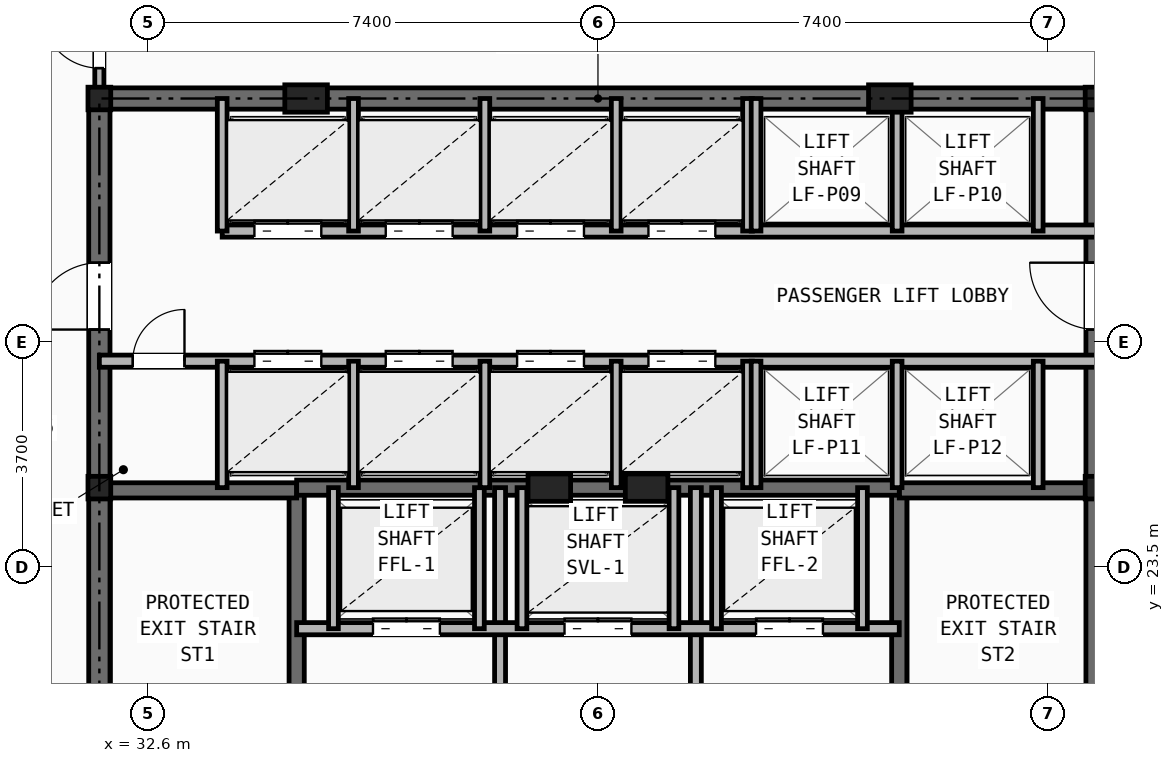
"""IFC4 building model, lengths in metres.
Left out: names, types, materials, properties, quantities, classifications, styles, units other than length and angle.
Written with IfcOpenShell. Run it as: python <this file> out.ifc"""

import sys

from ifc_helpers import new_model, si_unit, direction, frame, frame_2d, origin, origin_2d, place, context, subcontext, project, spatial, rectangle, i_section, extrude, element, fill, save


model = new_model("IFC4")
c1 = context("Model", 3, precision=1e-05, world=origin(), true_north=direction((0.0, 1.0)))
c2 = subcontext(c1, "Body", "Model", "MODEL_VIEW")
j1 = project(units=[si_unit("LENGTHUNIT", "METRE"), si_unit("PLANEANGLEUNIT", "RADIAN")], contexts=[c1])
p1 = place(None, origin())
s1 = spatial("IfcSite", under=j1, at=p1, CompositionType="ELEMENT")
p2 = place(p1, origin())
s2 = spatial("IfcBuilding", under=s1, at=p2, CompositionType="ELEMENT")
p3 = place(p2, frame((0.0, 0.0, 111.8)))
s3 = spatial("IfcBuildingStorey", under=s2, at=p3, CompositionType="ELEMENT", Elevation=111.8)
for number, where, z_axis, x_axis in (
    (1, (31.8, 24.8, 0.0), (0.0, 0.0, 1.0), (1.0, 0.0, 0.0)),
    (2, (48.2, 24.8, 0.0), (0.0, 0.0, 1.0), (1.0, 0.0, 0.0)),
    (3, (31.8, 31.2, 0.0), (0.0, 0.0, 1.0), (1.0, 0.0, 0.0)),
    (4, (48.2, 31.2, 0.0), (0.0, 0.0, 1.0), (1.0, 0.0, 0.0)),
):
    element("IfcColumn", number, at=place(p3, frame(where, z_axis=z_axis, x_axis=x_axis)), inside=s3, PredefinedType="COLUMN", context=c2, shape_type="SweptSolid", body=[
        extrude(i_section(OverallWidth=0.374, OverallDepth=0.372, WebThickness=0.016, FlangeThickness=0.026, at=origin_2d()), origin(), (0.0, 0.0, 1.0), 4.2),
    ])
for number, where, z_axis, x_axis in (
    (5, (35.2, 31.2, 0.0), (0.0, 0.0, 1.0), (1.0, 0.0, 0.0)),
    (6, (44.8, 31.2, 0.0), (0.0, 0.0, 1.0), (1.0, 0.0, 0.0)),
    (7, (39.2, 24.8, 0.0), (0.0, 0.0, 1.0), (1.0, 0.0, 0.0)),
    (8, (40.8, 24.8, 0.0), (0.0, 0.0, 1.0), (1.0, 0.0, 0.0)),
):
    element("IfcColumn", number, at=place(p3, frame(where, z_axis=z_axis, x_axis=x_axis)), inside=s3, PredefinedType="PILASTER", context=c2, shape_type="SweptSolid", body=[
        extrude(rectangle(XDim=0.7, YDim=0.45, at=origin_2d()), origin(), (0.0, 0.0, 1.0), 4.2),
    ])
p4 = place(p3, frame((31.8, 31.2, 0.0), z_axis=(0.0, 0.0, 1.0), x_axis=(1.0, 0.0, 0.0)))
e9 = element("IfcWall", 9, at=p4, inside=s3, PredefinedType="SHEAR", context=c2, shape_type="SweptSolid", body=[
    extrude(rectangle(XDim=16.4, YDim=0.35, at=frame_2d((8.2, 0.0))), origin(), (0.0, 0.0, 1.0), 3.96),
])
p5 = place(p3, frame((31.8, 16.4, 0.0), z_axis=(0.0, 0.0, 1.0), x_axis=(0.0, 1.0, 0.0)))
e10 = element("IfcWall", 10, at=p5, inside=s3, PredefinedType="SHEAR", context=c2, shape_type="SweptSolid", body=[
    extrude(rectangle(XDim=14.8, YDim=0.35, at=frame_2d((7.4, 0.0))), origin(), (0.0, 0.0, 1.0), 3.96),
])
p6 = place(p5, frame((11.0, 0.0, 0.0)))
e11 = element("IfcOpeningElement", 11, at=p6, cuts=e10, PredefinedType="OPENING", context=c2, shape_type="SweptSolid", body=[
    extrude(rectangle(XDim=1.1, YDim=2.15, at=frame_2d((0.55, 1.075))), frame((0.0, 0.185, 0.0), z_axis=(0.0, -1.0, 0.0), x_axis=(1.0, 0.0, 0.0)), (0.0, 0.0, 1.0), 0.37),
])
p7 = place(p3, frame((48.2, 16.4, 0.0), z_axis=(0.0, 0.0, 1.0), x_axis=(0.0, 1.0, 0.0)))
e12 = element("IfcWall", 12, at=p7, inside=s3, PredefinedType="SHEAR", context=c2, shape_type="SweptSolid", body=[
    extrude(rectangle(XDim=14.8, YDim=0.35, at=frame_2d((7.4, 0.0))), origin(), (0.0, 0.0, 1.0), 3.96),
])
p8 = place(p7, frame((11.0, 0.0, 0.0)))
e13 = element("IfcOpeningElement", 13, at=p8, cuts=e12, PredefinedType="OPENING", context=c2, shape_type="SweptSolid", body=[
    extrude(rectangle(XDim=1.1, YDim=2.15, at=frame_2d((0.55, 1.075))), frame((0.0, 0.185, 0.0), z_axis=(0.0, -1.0, 0.0), x_axis=(1.0, 0.0, 0.0)), (0.0, 0.0, 1.0), 0.37),
])
p9 = place(p3, frame((35.045, 16.4, 0.0), z_axis=(0.0, 0.0, 1.0), x_axis=(0.0, 1.0, 0.0)))
e14 = element("IfcWall", 14, at=p9, inside=s3, PredefinedType="SHEAR", context=c2, shape_type="SweptSolid", body=[
    extrude(rectangle(XDim=8.4, YDim=0.25, at=frame_2d((4.2, 0.0))), origin(), (0.0, 0.0, 1.0), 3.96),
])
p10 = place(p9, frame((0.45, 0.0, 0.0)))
e15 = element("IfcOpeningElement", 15, at=p10, cuts=e14, PredefinedType="OPENING", context=c2, shape_type="SweptSolid", body=[
    extrude(rectangle(XDim=0.95, YDim=2.1, at=frame_2d((0.475, 1.05))), frame((0.0, 0.135, 0.0), z_axis=(0.0, -1.0, 0.0), x_axis=(1.0, 0.0, 0.0)), (0.0, 0.0, 1.0), 0.27),
])
p11 = place(p3, frame((31.8, 24.755, 0.0), z_axis=(0.0, 0.0, 1.0), x_axis=(1.0, 0.0, 0.0)))
e16 = element("IfcWall", 16, at=p11, inside=s3, PredefinedType="SHEAR", context=c2, shape_type="SweptSolid", body=[
    extrude(rectangle(XDim=3.245, YDim=0.25, at=frame_2d((1.623, 0.0))), origin(), (0.0, 0.0, 1.0), 3.96),
])
p12 = place(p3, frame((44.955, 16.4, 0.0), z_axis=(0.0, 0.0, 1.0), x_axis=(0.0, 1.0, 0.0)))
e17 = element("IfcWall", 17, at=p12, inside=s3, PredefinedType="SHEAR", context=c2, shape_type="SweptSolid", body=[
    extrude(rectangle(XDim=8.4, YDim=0.25, at=frame_2d((4.2, 0.0))), origin(), (0.0, 0.0, 1.0), 3.96),
])
p13 = place(p12, frame((0.45, 0.0, 0.0)))
e18 = element("IfcOpeningElement", 18, at=p13, cuts=e17, PredefinedType="OPENING", context=c2, shape_type="SweptSolid", body=[
    extrude(rectangle(XDim=0.95, YDim=2.1, at=frame_2d((0.475, 1.05))), frame((0.0, 0.135, 0.0), z_axis=(0.0, -1.0, 0.0), x_axis=(1.0, 0.0, 0.0)), (0.0, 0.0, 1.0), 0.27),
])
p14 = place(p3, frame((44.955, 24.755, 0.0), z_axis=(0.0, 0.0, 1.0), x_axis=(1.0, 0.0, 0.0)))
e19 = element("IfcWall", 19, at=p14, inside=s3, PredefinedType="SHEAR", context=c2, shape_type="SweptSolid", body=[
    extrude(rectangle(XDim=3.245, YDim=0.25, at=frame_2d((1.623, 0.0))), origin(), (0.0, 0.0, 1.0), 3.96),
])
p15 = place(p3, frame((35.045, 24.8, 0.0), z_axis=(0.0, 0.0, 1.0), x_axis=(1.0, 0.0, 0.0)))
e20 = element("IfcWall", 20, at=p15, inside=s3, PredefinedType="SHEAR", context=c2, shape_type="SweptSolid", body=[
    extrude(rectangle(XDim=9.91, YDim=0.25, at=frame_2d((4.955, 0.0))), origin(), (0.0, 0.0, 1.0), 3.96),
])
p16 = place(p3, frame((38.39, 16.4, 0.0), z_axis=(0.0, 0.0, 1.0), x_axis=(0.0, 1.0, 0.0)))
e21 = element("IfcWall", 21, at=p16, inside=s3, PredefinedType="PARTITIONING", context=c2, shape_type="SweptSolid", body=[
    extrude(rectangle(XDim=8.4, YDim=0.18, at=frame_2d((4.2, 0.0))), origin(), (0.0, 0.0, 1.0), 3.411),
])
p17 = place(p16, frame((3.85, 0.0, 0.0)))
e22 = element("IfcOpeningElement", 22, at=p17, cuts=e21, PredefinedType="OPENING", context=c2, shape_type="SweptSolid", body=[
    extrude(rectangle(XDim=0.95, YDim=2.1, at=frame_2d((0.475, 1.05))), frame((0.0, 0.1, 0.0), z_axis=(0.0, -1.0, 0.0), x_axis=(1.0, 0.0, 0.0)), (0.0, 0.0, 1.0), 0.2),
])
p18 = place(p3, frame((41.61, 16.4, 0.0), z_axis=(0.0, 0.0, 1.0), x_axis=(0.0, 1.0, 0.0)))
e23 = element("IfcWall", 23, at=p18, inside=s3, PredefinedType="PARTITIONING", context=c2, shape_type="SweptSolid", body=[
    extrude(rectangle(XDim=8.4, YDim=0.18, at=frame_2d((4.2, 0.0))), origin(), (0.0, 0.0, 1.0), 3.411),
])
p19 = place(p3, frame((35.045, 22.48, 0.0), z_axis=(0.0, 0.0, 1.0), x_axis=(1.0, 0.0, 0.0)))
e24 = element("IfcWall", 24, at=p19, inside=s3, PredefinedType="SOLIDWALL", context=c2, shape_type="SweptSolid", body=[
    extrude(rectangle(XDim=9.91, YDim=0.2, at=frame_2d((4.955, 0.0))), origin(), (0.0, 0.0, 1.0), 3.96),
])
p20 = place(p19, frame((1.255, 0.0, 0.0)))
e25 = element("IfcOpeningElement", 25, at=p20, cuts=e24, PredefinedType="OPENING", context=c2, shape_type="SweptSolid", body=[
    extrude(rectangle(XDim=1.1, YDim=2.15, at=frame_2d((0.55, 1.075))), frame((0.0, 0.11, 0.0), z_axis=(0.0, -1.0, 0.0), x_axis=(1.0, 0.0, 0.0)), (0.0, 0.0, 1.0), 0.22),
])
p21 = place(p19, frame((7.555, 0.0, 0.0)))
e26 = element("IfcOpeningElement", 26, at=p21, cuts=e24, PredefinedType="OPENING", context=c2, shape_type="SweptSolid", body=[
    extrude(rectangle(XDim=1.1, YDim=2.15, at=frame_2d((0.55, 1.075))), frame((0.0, 0.11, 0.0), z_axis=(0.0, -1.0, 0.0), x_axis=(1.0, 0.0, 0.0)), (0.0, 0.0, 1.0), 0.22),
])
p22 = place(p19, frame((4.405, 0.0, 0.0)))
e27 = element("IfcOpeningElement", 27, at=p22, cuts=e24, PredefinedType="OPENING", context=c2, shape_type="SweptSolid", body=[
    extrude(rectangle(XDim=1.1, YDim=2.15, at=frame_2d((0.55, 1.075))), frame((0.0, 0.11, 0.0), z_axis=(0.0, -1.0, 0.0), x_axis=(1.0, 0.0, 0.0)), (0.0, 0.0, 1.0), 0.22),
])
for number, where, z_axis, x_axis in (
    (28, (35.65, 22.48, 0.0), (0.0, 0.0, 1.0), (0.0, 1.0, 0.0)),
    (29, (38.05, 22.48, 0.0), (0.0, 0.0, 1.0), (0.0, 1.0, 0.0)),
    (30, (41.95, 22.48, 0.0), (0.0, 0.0, 1.0), (0.0, 1.0, 0.0)),
    (31, (44.35, 22.48, 0.0), (0.0, 0.0, 1.0), (0.0, 1.0, 0.0)),
    (32, (38.75, 22.48, 0.0), (0.0, 0.0, 1.0), (0.0, 1.0, 0.0)),
    (33, (41.25, 22.48, 0.0), (0.0, 0.0, 1.0), (0.0, 1.0, 0.0)),
):
    element("IfcWall", number, at=place(p3, frame(where, z_axis=z_axis, x_axis=x_axis)), inside=s3, PredefinedType="SOLIDWALL", context=c2, shape_type="SweptSolid", body=[
        extrude(rectangle(XDim=2.32, YDim=0.16, at=frame_2d((1.16, 0.0))), origin(), (0.0, 0.0, 1.0), 3.96),
    ])
p23 = place(p3, frame((33.82, 29.02, 0.0), z_axis=(0.0, 0.0, 1.0), x_axis=(1.0, 0.0, 0.0)))
e34 = element("IfcWall", 34, at=p23, inside=s3, PredefinedType="SOLIDWALL", context=c2, shape_type="SweptSolid", body=[
    extrude(rectangle(XDim=14.38, YDim=0.2, at=frame_2d((7.19, 0.0))), origin(), (0.0, 0.0, 1.0), 3.411),
])
p24 = place(p23, frame((0.53, 0.0, 0.0)))
e35 = element("IfcOpeningElement", 35, at=p24, cuts=e34, PredefinedType="OPENING", context=c2, shape_type="SweptSolid", body=[
    extrude(rectangle(XDim=1.1, YDim=2.15, at=frame_2d((0.55, 1.075))), frame((0.0, 0.11, 0.0), z_axis=(0.0, -1.0, 0.0), x_axis=(1.0, 0.0, 0.0)), (0.0, 0.0, 1.0), 0.22),
])
p25 = place(p23, frame((2.69, 0.0, 0.0)))
e36 = element("IfcOpeningElement", 36, at=p25, cuts=e34, PredefinedType="OPENING", context=c2, shape_type="SweptSolid", body=[
    extrude(rectangle(XDim=1.1, YDim=2.15, at=frame_2d((0.55, 1.075))), frame((0.0, 0.11, 0.0), z_axis=(0.0, -1.0, 0.0), x_axis=(1.0, 0.0, 0.0)), (0.0, 0.0, 1.0), 0.22),
])
p26 = place(p23, frame((4.85, 0.0, 0.0)))
e37 = element("IfcOpeningElement", 37, at=p26, cuts=e34, PredefinedType="OPENING", context=c2, shape_type="SweptSolid", body=[
    extrude(rectangle(XDim=1.1, YDim=2.15, at=frame_2d((0.55, 1.075))), frame((0.0, 0.11, 0.0), z_axis=(0.0, -1.0, 0.0), x_axis=(1.0, 0.0, 0.0)), (0.0, 0.0, 1.0), 0.22),
])
p27 = place(p23, frame((7.01, 0.0, 0.0)))
e38 = element("IfcOpeningElement", 38, at=p27, cuts=e34, PredefinedType="OPENING", context=c2, shape_type="SweptSolid", body=[
    extrude(rectangle(XDim=1.1, YDim=2.15, at=frame_2d((0.55, 1.075))), frame((0.0, 0.11, 0.0), z_axis=(0.0, -1.0, 0.0), x_axis=(1.0, 0.0, 0.0)), (0.0, 0.0, 1.0), 0.22),
])
p28 = place(p3, frame((31.8, 26.88, 0.0), z_axis=(0.0, 0.0, 1.0), x_axis=(1.0, 0.0, 0.0)))
e39 = element("IfcWall", 39, at=p28, inside=s3, PredefinedType="SOLIDWALL", context=c2, shape_type="SweptSolid", body=[
    extrude(rectangle(XDim=16.4, YDim=0.2, at=frame_2d((8.2, 0.0))), origin(), (0.0, 0.0, 1.0), 3.411),
])
p29 = place(p28, frame((0.55, 0.0, 0.0)))
e40 = element("IfcOpeningElement", 40, at=p29, cuts=e39, PredefinedType="OPENING", context=c2, shape_type="SweptSolid", body=[
    extrude(rectangle(XDim=0.85, YDim=2.05, at=frame_2d((0.425, 1.025))), frame((0.0, 0.11, 0.0), z_axis=(0.0, -1.0, 0.0), x_axis=(1.0, 0.0, 0.0)), (0.0, 0.0, 1.0), 0.22),
])
p30 = place(p28, frame((2.55, 0.0, 0.0)))
e41 = element("IfcOpeningElement", 41, at=p30, cuts=e39, PredefinedType="OPENING", context=c2, shape_type="SweptSolid", body=[
    extrude(rectangle(XDim=1.1, YDim=2.15, at=frame_2d((0.55, 1.075))), frame((0.0, 0.11, 0.0), z_axis=(0.0, -1.0, 0.0), x_axis=(1.0, 0.0, 0.0)), (0.0, 0.0, 1.0), 0.22),
])
p31 = place(p28, frame((4.71, 0.0, 0.0)))
e42 = element("IfcOpeningElement", 42, at=p31, cuts=e39, PredefinedType="OPENING", context=c2, shape_type="SweptSolid", body=[
    extrude(rectangle(XDim=1.1, YDim=2.15, at=frame_2d((0.55, 1.075))), frame((0.0, 0.11, 0.0), z_axis=(0.0, -1.0, 0.0), x_axis=(1.0, 0.0, 0.0)), (0.0, 0.0, 1.0), 0.22),
])
p32 = place(p28, frame((6.87, 0.0, 0.0)))
e43 = element("IfcOpeningElement", 43, at=p32, cuts=e39, PredefinedType="OPENING", context=c2, shape_type="SweptSolid", body=[
    extrude(rectangle(XDim=1.1, YDim=2.15, at=frame_2d((0.55, 1.075))), frame((0.0, 0.11, 0.0), z_axis=(0.0, -1.0, 0.0), x_axis=(1.0, 0.0, 0.0)), (0.0, 0.0, 1.0), 0.22),
])
p33 = place(p28, frame((9.03, 0.0, 0.0)))
e44 = element("IfcOpeningElement", 44, at=p33, cuts=e39, PredefinedType="OPENING", context=c2, shape_type="SweptSolid", body=[
    extrude(rectangle(XDim=1.1, YDim=2.15, at=frame_2d((0.55, 1.075))), frame((0.0, 0.11, 0.0), z_axis=(0.0, -1.0, 0.0), x_axis=(1.0, 0.0, 0.0)), (0.0, 0.0, 1.0), 0.22),
])
p34 = place(p3, frame((33.82, 29.02, 0.0), z_axis=(0.0, 0.0, 1.0), x_axis=(0.0, 1.0, 0.0)))
e45 = element("IfcWall", 45, at=p34, inside=s3, PredefinedType="SOLIDWALL", context=c2, shape_type="SweptSolid", body=[
    extrude(rectangle(XDim=2.18, YDim=0.16, at=frame_2d((1.09, 0.0))), origin(), (0.0, 0.0, 1.0), 3.411),
])
p35 = place(p3, frame((33.82, 24.8, 0.0), z_axis=(0.0, 0.0, 1.0), x_axis=(0.0, 1.0, 0.0)))
e46 = element("IfcWall", 46, at=p35, inside=s3, PredefinedType="SOLIDWALL", context=c2, shape_type="SweptSolid", body=[
    extrude(rectangle(XDim=2.08, YDim=0.16, at=frame_2d((1.04, 0.0))), origin(), (0.0, 0.0, 1.0), 3.96),
])
for number, where, z_axis, x_axis in (
    (47, (35.98, 29.02, 0.0), (0.0, 0.0, 1.0), (0.0, 1.0, 0.0)),
    (48, (38.14, 29.02, 0.0), (0.0, 0.0, 1.0), (0.0, 1.0, 0.0)),
    (49, (40.3, 29.02, 0.0), (0.0, 0.0, 1.0), (0.0, 1.0, 0.0)),
    (50, (42.46, 29.02, 0.0), (0.0, 0.0, 1.0), (0.0, 1.0, 0.0)),
):
    element("IfcWall", number, at=place(p3, frame(where, z_axis=z_axis, x_axis=x_axis)), inside=s3, PredefinedType="SOLIDWALL", context=c2, shape_type="SweptSolid", body=[
        extrude(rectangle(XDim=2.18, YDim=0.16, at=frame_2d((1.09, 0.0))), origin(), (0.0, 0.0, 1.0), 3.411),
    ])
for number, where, z_axis, x_axis in (
    (51, (35.98, 24.8, 0.0), (0.0, 0.0, 1.0), (0.0, 1.0, 0.0)),
    (52, (38.14, 24.8, 0.0), (0.0, 0.0, 1.0), (0.0, 1.0, 0.0)),
    (53, (40.3, 24.8, 0.0), (0.0, 0.0, 1.0), (0.0, 1.0, 0.0)),
    (54, (42.46, 24.8, 0.0), (0.0, 0.0, 1.0), (0.0, 1.0, 0.0)),
):
    element("IfcWall", number, at=place(p3, frame(where, z_axis=z_axis, x_axis=x_axis)), inside=s3, PredefinedType="SOLIDWALL", context=c2, shape_type="SweptSolid", body=[
        extrude(rectangle(XDim=2.08, YDim=0.16, at=frame_2d((1.04, 0.0))), origin(), (0.0, 0.0, 1.0), 3.96),
    ])
for number, where, z_axis, x_axis in (
    (55, (42.6, 29.02, 0.0), (0.0, 0.0, 1.0), (0.0, 1.0, 0.0)),
    (56, (44.92, 29.02, 0.0), (0.0, 0.0, 1.0), (0.0, 1.0, 0.0)),
    (57, (47.24, 29.02, 0.0), (0.0, 0.0, 1.0), (0.0, 1.0, 0.0)),
):
    element("IfcWall", number, at=place(p3, frame(where, z_axis=z_axis, x_axis=x_axis)), inside=s3, PredefinedType="SOLIDWALL", context=c2, shape_type="SweptSolid", body=[
        extrude(rectangle(XDim=2.18, YDim=0.16, at=frame_2d((1.09, 0.0))), origin(), (0.0, 0.0, 1.0), 3.411),
    ])
for number, where, z_axis, x_axis in (
    (58, (42.6, 24.8, 0.0), (0.0, 0.0, 1.0), (0.0, 1.0, 0.0)),
    (59, (44.92, 24.8, 0.0), (0.0, 0.0, 1.0), (0.0, 1.0, 0.0)),
    (60, (47.24, 24.8, 0.0), (0.0, 0.0, 1.0), (0.0, 1.0, 0.0)),
):
    element("IfcWall", number, at=place(p3, frame(where, z_axis=z_axis, x_axis=x_axis)), inside=s3, PredefinedType="SOLIDWALL", context=c2, shape_type="SweptSolid", body=[
        extrude(rectangle(XDim=2.08, YDim=0.16, at=frame_2d((1.04, 0.0))), origin(), (0.0, 0.0, 1.0), 3.96),
    ])
p36 = place(p3, frame((31.8, 31.2, 0.0), z_axis=(0.0, 0.0, 1.0), x_axis=(0.0, 1.0, 0.0)))
e61 = element("IfcWall", 61, at=p36, inside=s3, PredefinedType="PARTITIONING", context=c2, shape_type="SweptSolid", body=[
    extrude(rectangle(XDim=5.3, YDim=0.15, at=frame_2d((2.65, 0.0))), origin(), (0.0, 0.0, 1.0), 2.975),
])
p37 = place(p36, frame((0.5, 0.0, 0.0)))
e62 = element("IfcOpeningElement", 62, at=p37, cuts=e61, PredefinedType="OPENING", context=c2, shape_type="SweptSolid", body=[
    extrude(rectangle(XDim=0.95, YDim=2.1, at=frame_2d((0.475, 1.05))), frame((0.0, 0.085, 0.0), z_axis=(0.0, -1.0, 0.0), x_axis=(1.0, 0.0, 0.0)), (0.0, 0.0, 1.0), 0.17),
])
p38 = place(p36, frame((4.23, 0.0, 0.0)))
e63 = element("IfcOpeningElement", 63, at=p38, cuts=e61, PredefinedType="OPENING", context=c2, shape_type="SweptSolid", body=[
    extrude(rectangle(XDim=0.95, YDim=2.1, at=frame_2d((0.475, 1.05))), frame((0.0, 0.085, 0.0), z_axis=(0.0, -1.0, 0.0), x_axis=(1.0, 0.0, 0.0)), (0.0, 0.0, 1.0), 0.17),
])
p39 = place(p20, origin())
e64 = element("IfcDoor", 64, at=p39, inside=s3, OperationType="DOUBLE_DOOR_SLIDING", PredefinedType="DOOR", context=c2, shape_type="SweptSolid", body=[
    extrude(rectangle(XDim=1.1, YDim=2.15, at=frame_2d((0.55, 1.075))), frame((0.0, 0.025, 0.0), z_axis=(0.0, -1.0, 0.0), x_axis=(1.0, 0.0, 0.0)), (0.0, 0.0, 1.0), 0.05),
])
fill(e25, e64)
p40 = place(p21, origin())
e65 = element("IfcDoor", 65, at=p40, inside=s3, OperationType="DOUBLE_DOOR_SLIDING", PredefinedType="DOOR", context=c2, shape_type="SweptSolid", body=[
    extrude(rectangle(XDim=1.1, YDim=2.15, at=frame_2d((0.55, 1.075))), frame((0.0, 0.025, 0.0), z_axis=(0.0, -1.0, 0.0), x_axis=(1.0, 0.0, 0.0)), (0.0, 0.0, 1.0), 0.05),
])
fill(e26, e65)
p41 = place(p22, origin())
e66 = element("IfcDoor", 66, at=p41, inside=s3, OperationType="DOUBLE_DOOR_SLIDING", PredefinedType="DOOR", context=c2, shape_type="SweptSolid", body=[
    extrude(rectangle(XDim=1.1, YDim=2.15, at=frame_2d((0.55, 1.075))), frame((0.0, 0.025, 0.0), z_axis=(0.0, -1.0, 0.0), x_axis=(1.0, 0.0, 0.0)), (0.0, 0.0, 1.0), 0.05),
])
fill(e27, e66)
p42 = place(p29, origin())
e67 = element("IfcDoor", 67, at=p42, inside=s3, OperationType="SINGLE_SWING_RIGHT", PredefinedType="DOOR", context=c2, shape_type="SweptSolid", body=[
    extrude(rectangle(XDim=0.85, YDim=2.05, at=frame_2d((0.425, 1.025))), frame((0.0, 0.025, 0.0), z_axis=(0.0, -1.0, 0.0), x_axis=(1.0, 0.0, 0.0)), (0.0, 0.0, 1.0), 0.05),
])
fill(e40, e67)
p43 = place(p6, origin())
e68 = element("IfcDoor", 68, at=p43, inside=s3, OperationType="SINGLE_SWING_LEFT", PredefinedType="DOOR", context=c2, shape_type="SweptSolid", body=[
    extrude(rectangle(XDim=1.1, YDim=2.15, at=frame_2d((0.55, 1.075))), frame((0.0, 0.025, 0.0), z_axis=(0.0, -1.0, 0.0), x_axis=(1.0, 0.0, 0.0)), (0.0, 0.0, 1.0), 0.05),
])
fill(e11, e68)
p44 = place(p24, origin())
e69 = element("IfcDoor", 69, at=p44, inside=s3, OperationType="DOUBLE_DOOR_SLIDING", PredefinedType="DOOR", context=c2, shape_type="SweptSolid", body=[
    extrude(rectangle(XDim=1.1, YDim=2.15, at=frame_2d((0.55, 1.075))), frame((0.0, 0.025, 0.0), z_axis=(0.0, -1.0, 0.0), x_axis=(1.0, 0.0, 0.0)), (0.0, 0.0, 1.0), 0.05),
])
fill(e35, e69)
p45 = place(p25, origin())
e70 = element("IfcDoor", 70, at=p45, inside=s3, OperationType="DOUBLE_DOOR_SLIDING", PredefinedType="DOOR", context=c2, shape_type="SweptSolid", body=[
    extrude(rectangle(XDim=1.1, YDim=2.15, at=frame_2d((0.55, 1.075))), frame((0.0, 0.025, 0.0), z_axis=(0.0, -1.0, 0.0), x_axis=(1.0, 0.0, 0.0)), (0.0, 0.0, 1.0), 0.05),
])
fill(e36, e70)
p46 = place(p26, origin())
e71 = element("IfcDoor", 71, at=p46, inside=s3, OperationType="DOUBLE_DOOR_SLIDING", PredefinedType="DOOR", context=c2, shape_type="SweptSolid", body=[
    extrude(rectangle(XDim=1.1, YDim=2.15, at=frame_2d((0.55, 1.075))), frame((0.0, 0.025, 0.0), z_axis=(0.0, -1.0, 0.0), x_axis=(1.0, 0.0, 0.0)), (0.0, 0.0, 1.0), 0.05),
])
fill(e37, e71)
p47 = place(p27, origin())
e72 = element("IfcDoor", 72, at=p47, inside=s3, OperationType="DOUBLE_DOOR_SLIDING", PredefinedType="DOOR", context=c2, shape_type="SweptSolid", body=[
    extrude(rectangle(XDim=1.1, YDim=2.15, at=frame_2d((0.55, 1.075))), frame((0.0, 0.025, 0.0), z_axis=(0.0, -1.0, 0.0), x_axis=(1.0, 0.0, 0.0)), (0.0, 0.0, 1.0), 0.05),
])
fill(e38, e72)
p48 = place(p30, origin())
e73 = element("IfcDoor", 73, at=p48, inside=s3, OperationType="DOUBLE_DOOR_SLIDING", PredefinedType="DOOR", context=c2, shape_type="SweptSolid", body=[
    extrude(rectangle(XDim=1.1, YDim=2.15, at=frame_2d((0.55, 1.075))), frame((0.0, 0.025, 0.0), z_axis=(0.0, -1.0, 0.0), x_axis=(1.0, 0.0, 0.0)), (0.0, 0.0, 1.0), 0.05),
])
fill(e41, e73)
p49 = place(p31, origin())
e74 = element("IfcDoor", 74, at=p49, inside=s3, OperationType="DOUBLE_DOOR_SLIDING", PredefinedType="DOOR", context=c2, shape_type="SweptSolid", body=[
    extrude(rectangle(XDim=1.1, YDim=2.15, at=frame_2d((0.55, 1.075))), frame((0.0, 0.025, 0.0), z_axis=(0.0, -1.0, 0.0), x_axis=(1.0, 0.0, 0.0)), (0.0, 0.0, 1.0), 0.05),
])
fill(e42, e74)
p50 = place(p32, origin())
e75 = element("IfcDoor", 75, at=p50, inside=s3, OperationType="DOUBLE_DOOR_SLIDING", PredefinedType="DOOR", context=c2, shape_type="SweptSolid", body=[
    extrude(rectangle(XDim=1.1, YDim=2.15, at=frame_2d((0.55, 1.075))), frame((0.0, 0.025, 0.0), z_axis=(0.0, -1.0, 0.0), x_axis=(1.0, 0.0, 0.0)), (0.0, 0.0, 1.0), 0.05),
])
fill(e43, e75)
p51 = place(p33, origin())
e76 = element("IfcDoor", 76, at=p51, inside=s3, OperationType="DOUBLE_DOOR_SLIDING", PredefinedType="DOOR", context=c2, shape_type="SweptSolid", body=[
    extrude(rectangle(XDim=1.1, YDim=2.15, at=frame_2d((0.55, 1.075))), frame((0.0, 0.025, 0.0), z_axis=(0.0, -1.0, 0.0), x_axis=(1.0, 0.0, 0.0)), (0.0, 0.0, 1.0), 0.05),
])
fill(e44, e76)
p52 = place(p37, origin())
e77 = element("IfcDoor", 77, at=p52, inside=s3, OperationType="SINGLE_SWING_RIGHT", PredefinedType="DOOR", context=c2, shape_type="SweptSolid", body=[
    extrude(rectangle(XDim=0.95, YDim=2.1, at=frame_2d((0.475, 1.05))), frame((0.0, 0.025, 0.0), z_axis=(0.0, -1.0, 0.0), x_axis=(1.0, 0.0, 0.0)), (0.0, 0.0, 1.0), 0.05),
])
fill(e62, e77)
save(model, sys.argv[1])
